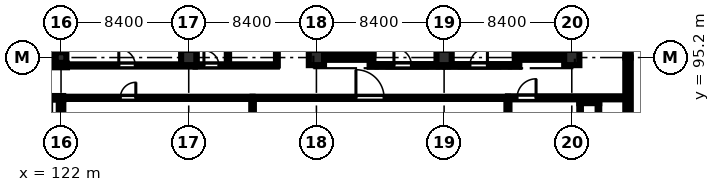
"""IFC4 building model, lengths in metres.
Left out: names, types, materials, properties, quantities, classifications, styles, units other than length and angle.
Written with IfcOpenShell. Run it as: python <this file> out.ifc"""

import sys

from ifc_helpers import new_model, si_unit, direction, frame, frame_2d, origin, origin_2d, place, context, subcontext, project, spatial, rectangle, extrude, element, fill, save


model = new_model("IFC4")
c1 = context("Model", 3, precision=1e-05, world=origin(), true_north=direction((0.0, 1.0)))
c2 = subcontext(c1, "Body", "Model", "MODEL_VIEW")
j1 = project(units=[si_unit("LENGTHUNIT", "METRE"), si_unit("PLANEANGLEUNIT", "RADIAN")], contexts=[c1])
p1 = place(None, origin())
s1 = spatial("IfcSite", under=j1, at=p1, CompositionType="ELEMENT")
p2 = place(p1, origin())
s2 = spatial("IfcBuilding", under=s1, at=p2, CompositionType="ELEMENT")
p3 = place(p2, origin())
s3 = spatial("IfcBuildingStorey", under=s2, at=p3, CompositionType="ELEMENT", Elevation=0.0)
for number, where, z_axis, x_axis in (
    (1, (121.15, 95.2, 0.0), (0.0, 0.0, 1.0), (1.0, 0.0, 0.0)),
    (2, (122.0, 95.2, 0.0), (0.0, 0.0, 1.0), (1.0, 0.0, 0.0)),
):
    element("IfcColumn", number, at=place(p3, frame(where, z_axis=z_axis, x_axis=x_axis)), inside=s3, PredefinedType="COLUMN", context=c2, shape_type="SweptSolid", body=[
        extrude(rectangle(XDim=0.7, YDim=0.7, at=origin_2d()), origin(), (0.0, 0.0, 1.0), 5.18),
    ])
for number, where, z_axis, x_axis in (
    (3, (130.4, 95.2, 0.0), (0.0, 0.0, 1.0), (1.0, 0.0, 0.0)),
    (4, (138.8, 95.2, 0.0), (0.0, 0.0, 1.0), (1.0, 0.0, 0.0)),
    (5, (147.2, 95.2, 0.0), (0.0, 0.0, 1.0), (1.0, 0.0, 0.0)),
    (6, (155.6, 95.2, 0.0), (0.0, 0.0, 1.0), (1.0, 0.0, 0.0)),
):
    element("IfcColumn", number, at=place(p3, frame(where, z_axis=z_axis, x_axis=x_axis)), inside=s3, PredefinedType="COLUMN", context=c2, shape_type="SweptSolid", body=[
        extrude(rectangle(XDim=1.0, YDim=1.0, at=origin_2d()), origin(), (0.0, 0.0, 1.0), 5.18),
    ])
p4 = place(p3, frame((138.65, 95.25, 0.0), z_axis=(0.0, 0.0, 1.0), x_axis=(1.0, 0.0, 0.0)))
e7 = element("IfcWall", 7, at=p4, inside=s3, PredefinedType="SHEAR", context=c2, shape_type="SweptSolid", body=[
    extrude(rectangle(XDim=3.9, YDim=0.4, at=frame_2d((1.95, 0.0))), origin(), (0.0, 0.0, 1.0), 5.18),
])
p5 = place(p3, frame((138.85, 95.45, 0.0), z_axis=(0.0, 0.0, 1.0), x_axis=(0.0, 1.0, 0.0)))
e8 = element("IfcWall", 8, at=p5, inside=s3, PredefinedType="SHEAR", context=c2, shape_type="SweptSolid", body=[
    extrude(rectangle(XDim=7.9, YDim=0.4, at=frame_2d((3.95, 0.0))), origin(), (0.0, 0.0, 1.0), 5.18),
])
p6 = place(p3, frame((142.35, 95.45, 0.0), z_axis=(0.0, 0.0, 1.0), x_axis=(0.0, 1.0, 0.0)))
e9 = element("IfcWall", 9, at=p6, inside=s3, PredefinedType="SHEAR", context=c2, shape_type="SweptSolid", body=[
    extrude(rectangle(XDim=7.9, YDim=0.4, at=frame_2d((3.95, 0.0))), origin(), (0.0, 0.0, 1.0), 5.18),
])
p7 = place(p6, frame((0.22, 0.0, 0.0)))
e10 = element("IfcOpeningElement", 10, at=p7, cuts=e9, PredefinedType="OPENING", context=c2, shape_type="SweptSolid", body=[
    extrude(rectangle(XDim=1.15, YDim=2.15, at=frame_2d((0.575, 1.075))), frame((0.0, 0.21, 0.0), z_axis=(0.0, -1.0, 0.0), x_axis=(1.0, 0.0, 0.0)), (0.0, 0.0, 1.0), 0.42),
])
p8 = place(p3, frame((151.85, 95.25, 0.0), z_axis=(0.0, 0.0, 1.0), x_axis=(1.0, 0.0, 0.0)))
e11 = element("IfcWall", 11, at=p8, inside=s3, PredefinedType="SHEAR", context=c2, shape_type="SweptSolid", body=[
    extrude(rectangle(XDim=3.9, YDim=0.4, at=frame_2d((1.95, 0.0))), origin(), (0.0, 0.0, 1.0), 5.18),
])
p9 = place(p3, frame((152.05, 95.45, 0.0), z_axis=(0.0, 0.0, 1.0), x_axis=(0.0, 1.0, 0.0)))
e12 = element("IfcWall", 12, at=p9, inside=s3, PredefinedType="SHEAR", context=c2, shape_type="SweptSolid", body=[
    extrude(rectangle(XDim=7.9, YDim=0.4, at=frame_2d((3.95, 0.0))), origin(), (0.0, 0.0, 1.0), 5.18),
])
p10 = place(p9, frame((0.35, 0.0, 0.0)))
e13 = element("IfcOpeningElement", 13, at=p10, cuts=e12, PredefinedType="OPENING", context=c2, shape_type="SweptSolid", body=[
    extrude(rectangle(XDim=1.15, YDim=2.15, at=frame_2d((0.575, 1.075))), frame((0.0, 0.21, 0.0), z_axis=(0.0, -1.0, 0.0), x_axis=(1.0, 0.0, 0.0)), (0.0, 0.0, 1.0), 0.42),
])
p11 = place(p3, frame((155.55, 95.45, 0.0), z_axis=(0.0, 0.0, 1.0), x_axis=(0.0, 1.0, 0.0)))
e14 = element("IfcWall", 14, at=p11, inside=s3, PredefinedType="SHEAR", context=c2, shape_type="SweptSolid", body=[
    extrude(rectangle(XDim=7.9, YDim=0.4, at=frame_2d((3.95, 0.0))), origin(), (0.0, 0.0, 1.0), 5.18),
])
p12 = place(p3, frame((159.3, 95.2, 0.0), z_axis=(0.0, 0.0, 1.0), x_axis=(0.0, -1.0, 0.0)))
e15 = element("IfcWall", 15, at=p12, inside=s3, PredefinedType="STANDARD", context=c2, shape_type="SweptSolid", body=[
    extrude(rectangle(XDim=8.4, YDim=0.36, at=frame_2d((4.2, 0.0))), origin(), (0.0, 0.0, 1.0), 4.78),
])
p13 = place(p12, frame((3.6, 0.0, 1.1)))
e16 = element("IfcOpeningElement", 16, at=p13, cuts=e15, PredefinedType="OPENING", context=c2, shape_type="SweptSolid", body=[
    extrude(rectangle(XDim=1.8, YDim=1.8, at=frame_2d((0.9, 0.9))), frame((0.0, 0.19, 0.0), z_axis=(0.0, -1.0, 0.0), x_axis=(1.0, 0.0, 0.0)), (0.0, 0.0, 1.0), 0.38),
])
p14 = place(p3, frame((159.3, 103.6, 0.0), z_axis=(0.0, 0.0, 1.0), x_axis=(0.0, -1.0, 0.0)))
e17 = element("IfcWall", 17, at=p14, inside=s3, PredefinedType="STANDARD", context=c2, shape_type="SweptSolid", body=[
    extrude(rectangle(XDim=8.4, YDim=0.36, at=frame_2d((4.2, 0.0))), origin(), (0.0, 0.0, 1.0), 4.78),
])
p15 = place(p14, frame((1.15, 0.0, 1.1)))
e18 = element("IfcOpeningElement", 18, at=p15, cuts=e17, PredefinedType="OPENING", context=c2, shape_type="SweptSolid", body=[
    extrude(rectangle(XDim=1.4, YDim=1.4, at=frame_2d((0.7, 0.7))), frame((0.0, 0.19, 0.0), z_axis=(0.0, -1.0, 0.0), x_axis=(1.0, 0.0, 0.0)), (0.0, 0.0, 1.0), 0.38),
])
p16 = place(p3, frame((122.0, 87.15, 0.0), z_axis=(0.0, 0.0, 1.0), x_axis=(0.0, 1.0, 0.0)))
e19 = element("IfcWall", 19, at=p16, inside=s3, PredefinedType="STANDARD", context=c2, shape_type="SweptSolid", body=[
    extrude(rectangle(XDim=5.27, YDim=0.3, at=frame_2d((2.635, 0.0))), origin(), (0.0, 0.0, 1.0), 4.43),
])
p17 = place(p3, frame((122.14, 92.55, 0.0), z_axis=(0.0, 0.0, 1.0), x_axis=(-1.0, 0.0, 0.0)))
e20 = element("IfcWall", 20, at=p17, inside=s3, PredefinedType="STANDARD", context=c2, shape_type="SweptSolid", body=[
    extrude(rectangle(XDim=1.11, YDim=0.24, at=frame_2d((0.555, 0.0))), origin(), (0.0, 0.0, 1.0), 5.18),
])
p18 = place(p3, frame((121.03, 94.68, 0.0), z_axis=(0.0, 0.0, 1.0), x_axis=(1.0, 0.0, 0.0)))
e21 = element("IfcWall", 21, at=p18, inside=s3, PredefinedType="STANDARD", context=c2, shape_type="SweptSolid", body=[
    extrude(rectangle(XDim=1.36, YDim=0.24, at=frame_2d((0.68, 0.0))), origin(), (0.0, 0.0, 1.0), 5.18),
])
p19 = place(p3, frame((122.0, 95.55, 0.0), z_axis=(0.0, 0.0, 1.0), x_axis=(0.0, 1.0, 0.0)))
e22 = element("IfcWall", 22, at=p19, inside=s3, PredefinedType="STANDARD", context=c2, shape_type="SweptSolid", body=[
    extrude(rectangle(XDim=7.7, YDim=0.3, at=frame_2d((3.85, 0.0))), origin(), (0.0, 0.0, 1.0), 4.43),
])
p20 = place(p3, frame((142.3, 94.68, 0.0), z_axis=(0.0, 0.0, 1.0), x_axis=(1.0, 0.0, 0.0)))
e23 = element("IfcWall", 23, at=p20, inside=s3, PredefinedType="STANDARD", context=c2, shape_type="SweptSolid", body=[
    extrude(rectangle(XDim=4.8, YDim=0.18, at=frame_2d((2.4, 0.0))), origin(), (0.0, 0.0, 1.0), 5.18),
])
p21 = place(p20, frame((1.6, 0.0, 0.0)))
e24 = element("IfcOpeningElement", 24, at=p21, cuts=e23, PredefinedType="OPENING", context=c2, shape_type="SweptSolid", body=[
    extrude(rectangle(XDim=1.15, YDim=2.15, at=frame_2d((0.575, 1.075))), frame((0.0, 0.1, 0.0), z_axis=(0.0, -1.0, 0.0), x_axis=(1.0, 0.0, 0.0)), (0.0, 0.0, 1.0), 0.2),
])
p22 = place(p3, frame((147.3, 94.68, 0.0), z_axis=(0.0, 0.0, 1.0), x_axis=(1.0, 0.0, 0.0)))
e25 = element("IfcWall", 25, at=p22, inside=s3, PredefinedType="STANDARD", context=c2, shape_type="SweptSolid", body=[
    extrude(rectangle(XDim=4.85, YDim=0.18, at=frame_2d((2.425, 0.0))), origin(), (0.0, 0.0, 1.0), 5.18),
])
p23 = place(p22, frame((1.6, 0.0, 0.0)))
e26 = element("IfcOpeningElement", 26, at=p23, cuts=e25, PredefinedType="OPENING", context=c2, shape_type="SweptSolid", body=[
    extrude(rectangle(XDim=1.15, YDim=2.15, at=frame_2d((0.575, 1.075))), frame((0.0, 0.1, 0.0), z_axis=(0.0, -1.0, 0.0), x_axis=(1.0, 0.0, 0.0)), (0.0, 0.0, 1.0), 0.2),
])
p24 = place(p3, frame((130.85, 94.68, 0.0), z_axis=(0.0, 0.0, 1.0), x_axis=(1.0, 0.0, 0.0)))
e27 = element("IfcWall", 27, at=p24, inside=s3, PredefinedType="PARTITIONING", context=c2, shape_type="SweptSolid", body=[
    extrude(rectangle(XDim=5.35, YDim=0.15, at=frame_2d((2.675, 0.0))), origin(), (0.0, 0.0, 1.0), 5.18),
])
p25 = place(p24, frame((0.55, 0.0, 0.0)))
e28 = element("IfcOpeningElement", 28, at=p25, cuts=e27, PredefinedType="OPENING", context=c2, shape_type="SweptSolid", body=[
    extrude(rectangle(XDim=0.98, YDim=2.12, at=frame_2d((0.49, 1.06))), frame((0.0, 0.085, 0.0), z_axis=(0.0, -1.0, 0.0), x_axis=(1.0, 0.0, 0.0)), (0.0, 0.0, 1.0), 0.17),
])
p26 = place(p3, frame((132.98, 94.68, 0.0), z_axis=(0.0, 0.0, 1.0), x_axis=(0.0, 1.0, 0.0)))
e29 = element("IfcWall", 29, at=p26, inside=s3, PredefinedType="PARTITIONING", context=c2, shape_type="SweptSolid", body=[
    extrude(rectangle(XDim=8.57, YDim=0.15, at=frame_2d((4.285, 0.0))), origin(), (0.0, 0.0, 1.0), 5.18),
])
p27 = place(p26, frame((0.9, 0.0, 0.0)))
e30 = element("IfcOpeningElement", 30, at=p27, cuts=e29, PredefinedType="OPENING", context=c2, shape_type="SweptSolid", body=[
    extrude(rectangle(XDim=1.0, YDim=2.12, at=frame_2d((0.5, 1.06))), frame((0.0, 0.085, 0.0), z_axis=(0.0, -1.0, 0.0), x_axis=(1.0, 0.0, 0.0)), (0.0, 0.0, 1.0), 0.17),
])
p28 = place(p26, frame((3.7, 0.0, 0.0)))
e31 = element("IfcOpeningElement", 31, at=p28, cuts=e29, PredefinedType="OPENING", context=c2, shape_type="SweptSolid", body=[
    extrude(rectangle(XDim=0.92, YDim=2.1, at=frame_2d((0.46, 1.05))), frame((0.0, 0.085, 0.0), z_axis=(0.0, -1.0, 0.0), x_axis=(1.0, 0.0, 0.0)), (0.0, 0.0, 1.0), 0.17),
])
p29 = place(p26, frame((6.5, 0.0, 0.0)))
e32 = element("IfcOpeningElement", 32, at=p29, cuts=e29, PredefinedType="OPENING", context=c2, shape_type="SweptSolid", body=[
    extrude(rectangle(XDim=0.92, YDim=2.1, at=frame_2d((0.46, 1.05))), frame((0.0, 0.085, 0.0), z_axis=(0.0, -1.0, 0.0), x_axis=(1.0, 0.0, 0.0)), (0.0, 0.0, 1.0), 0.17),
])
p30 = place(p3, frame((130.85, 94.68, 0.0), z_axis=(0.0, 0.0, 1.0), x_axis=(0.0, 1.0, 0.0)))
e33 = element("IfcWall", 33, at=p30, inside=s3, PredefinedType="PARTITIONING", context=c2, shape_type="SweptSolid", body=[
    extrude(rectangle(XDim=8.57, YDim=0.15, at=frame_2d((4.285, 0.0))), origin(), (0.0, 0.0, 1.0), 5.18),
])
p31 = place(p3, frame((136.2, 94.68, 0.0), z_axis=(0.0, 0.0, 1.0), x_axis=(0.0, 1.0, 0.0)))
e34 = element("IfcWall", 34, at=p31, inside=s3, PredefinedType="PARTITIONING", context=c2, shape_type="SweptSolid", body=[
    extrude(rectangle(XDim=9.07, YDim=0.12, at=frame_2d((4.535, 0.0))), origin(), (0.0, 0.0, 1.0), 5.18),
])
p32 = place(p3, frame((122.4, 94.68, 0.0), z_axis=(0.0, 0.0, 1.0), x_axis=(1.0, 0.0, 0.0)))
e35 = element("IfcWall", 35, at=p32, inside=s3, PredefinedType="PARTITIONING", context=c2, shape_type="SweptSolid", body=[
    extrude(rectangle(XDim=8.4, YDim=0.145, at=frame_2d((4.2, 0.0))), origin(), (0.0, 0.0, 1.0), 5.18),
])
p33 = place(p32, frame((3.4, 0.0, 0.0)))
e36 = element("IfcOpeningElement", 36, at=p33, cuts=e35, PredefinedType="OPENING", context=c2, shape_type="SweptSolid", body=[
    extrude(rectangle(XDim=1.08, YDim=2.15, at=frame_2d((0.54, 1.075))), frame((0.0, 0.083, 0.0), z_axis=(0.0, -1.0, 0.0), x_axis=(1.0, 0.0, 0.0)), (0.0, 0.0, 1.0), 0.165),
])
p34 = place(p3, frame((122.15, 92.55, 0.0), z_axis=(0.0, 0.0, 1.0), x_axis=(1.0, 0.0, 0.0)))
e37 = element("IfcWall", 37, at=p34, inside=s3, PredefinedType="PARTITIONING", context=c2, shape_type="SweptSolid", body=[
    extrude(rectangle(XDim=12.45, YDim=0.145, at=frame_2d((6.225, 0.0))), origin(), (0.0, 0.0, 1.0), 5.18),
])
p35 = place(p34, frame((3.75, 0.0, 0.0)))
e38 = element("IfcOpeningElement", 38, at=p35, cuts=e37, PredefinedType="OPENING", context=c2, shape_type="SweptSolid", body=[
    extrude(rectangle(XDim=1.02, YDim=2.15, at=frame_2d((0.51, 1.075))), frame((0.0, 0.083, 0.0), z_axis=(0.0, -1.0, 0.0), x_axis=(1.0, 0.0, 0.0)), (0.0, 0.0, 1.0), 0.165),
])
p36 = place(p3, frame((134.6, 92.55, 0.0), z_axis=(0.0, 0.0, 1.0), x_axis=(1.0, 0.0, 0.0)))
e39 = element("IfcWall", 39, at=p36, inside=s3, PredefinedType="PARTITIONING", context=c2, shape_type="SweptSolid", body=[
    extrude(rectangle(XDim=16.8, YDim=0.145, at=frame_2d((8.4, 0.0))), origin(), (0.0, 0.0, 1.0), 5.18),
])
p37 = place(p36, frame((6.8, 0.0, 0.0)))
e40 = element("IfcOpeningElement", 40, at=p37, cuts=e39, PredefinedType="OPENING", context=c2, shape_type="SweptSolid", body=[
    extrude(rectangle(XDim=1.85, YDim=2.25, at=frame_2d((0.925, 1.125))), frame((0.0, 0.083, 0.0), z_axis=(0.0, -1.0, 0.0), x_axis=(1.0, 0.0, 0.0)), (0.0, 0.0, 1.0), 0.165),
])
p38 = place(p3, frame((134.6, 78.55, 0.0), z_axis=(0.0, 0.0, 1.0), x_axis=(0.0, 1.0, 0.0)))
e41 = element("IfcWall", 41, at=p38, inside=s3, PredefinedType="PARTITIONING", context=c2, shape_type="SweptSolid", body=[
    extrude(rectangle(XDim=14.0, YDim=0.172, at=frame_2d((7.0, 0.0))), origin(), (0.0, 0.0, 1.0), 4.63),
])
p39 = place(p3, frame((151.4, 92.55, 0.0), z_axis=(0.0, 0.0, 1.0), x_axis=(1.0, 0.0, 0.0)))
e42 = element("IfcWall", 42, at=p39, inside=s3, PredefinedType="SOLIDWALL", context=c2, shape_type="SweptSolid", body=[
    extrude(rectangle(XDim=7.72, YDim=0.2, at=frame_2d((3.86, 0.0))), origin(), (0.0, 0.0, 1.0), 5.18),
])
p40 = place(p39, frame((0.6, 0.0, 0.0)))
e43 = element("IfcOpeningElement", 43, at=p40, cuts=e42, PredefinedType="OPENING", context=c2, shape_type="SweptSolid", body=[
    extrude(rectangle(XDim=1.25, YDim=2.2, at=frame_2d((0.625, 1.1))), frame((0.0, 0.11, 0.0), z_axis=(0.0, -1.0, 0.0), x_axis=(1.0, 0.0, 0.0)), (0.0, 0.0, 1.0), 0.22),
])
p41 = place(p3, frame((151.4, 78.55, 0.0), z_axis=(0.0, 0.0, 1.0), x_axis=(0.0, 1.0, 0.0)))
e44 = element("IfcWall", 44, at=p41, inside=s3, PredefinedType="SOLIDWALL", context=c2, shape_type="SweptSolid", body=[
    extrude(rectangle(XDim=14.0, YDim=0.2, at=frame_2d((7.0, 0.0))), origin(), (0.0, 0.0, 1.0), 4.78),
])
p42 = place(p3, frame((156.095, 92.252, 0.0), z_axis=(0.0, 0.0, 1.0), x_axis=(1.0, 0.0, 0.0)))
e45 = element("IfcWall", 45, at=p42, inside=s3, PredefinedType="PARTITIONING", context=c2, shape_type="SweptSolid", body=[
    extrude(rectangle(XDim=1.31, YDim=0.105, at=frame_2d((0.655, 0.0))), origin(), (0.0, 0.0, 1.0), 5.18),
])
for number, where, z_axis, x_axis in (
    (46, (156.147, 91.2, 0.0), (0.0, 0.0, 1.0), (0.0, 1.0, 0.0)),
    (47, (157.353, 91.2, 0.0), (0.0, 0.0, 1.0), (0.0, 1.0, 0.0)),
):
    element("IfcWall", number, at=place(p3, frame(where, z_axis=z_axis, x_axis=x_axis)), inside=s3, PredefinedType="PARTITIONING", context=c2, shape_type="SweptSolid", body=[
        extrude(rectangle(XDim=1.0, YDim=0.105, at=frame_2d((0.5, 0.0))), origin(), (0.0, 0.0, 1.0), 5.18),
    ])
p43 = place(p21, origin())
e48 = element("IfcDoor", 48, at=p43, inside=s3, OperationType="SINGLE_SWING_LEFT", PredefinedType="DOOR", context=c2, shape_type="SweptSolid", body=[
    extrude(rectangle(XDim=1.15, YDim=2.15, at=frame_2d((0.575, 1.075))), frame((0.0, 0.025, 0.0), z_axis=(0.0, -1.0, 0.0), x_axis=(1.0, 0.0, 0.0)), (0.0, 0.0, 1.0), 0.05),
])
fill(e24, e48)
p44 = place(p23, origin())
e49 = element("IfcDoor", 49, at=p44, inside=s3, OperationType="SINGLE_SWING_RIGHT", PredefinedType="DOOR", context=c2, shape_type="SweptSolid", body=[
    extrude(rectangle(XDim=1.15, YDim=2.15, at=frame_2d((0.575, 1.075))), frame((0.0, 0.025, 0.0), z_axis=(0.0, -1.0, 0.0), x_axis=(1.0, 0.0, 0.0)), (0.0, 0.0, 1.0), 0.05),
])
fill(e26, e49)
p45 = place(p25, origin())
e50 = element("IfcDoor", 50, at=p45, inside=s3, OperationType="SINGLE_SWING_LEFT", PredefinedType="DOOR", context=c2, shape_type="SweptSolid", body=[
    extrude(rectangle(XDim=0.98, YDim=2.12, at=frame_2d((0.49, 1.06))), frame((0.0, 0.025, 0.0), z_axis=(0.0, -1.0, 0.0), x_axis=(1.0, 0.0, 0.0)), (0.0, 0.0, 1.0), 0.05),
])
fill(e28, e50)
p46 = place(p27, origin())
e51 = element("IfcDoor", 51, at=p46, inside=s3, OperationType="SINGLE_SWING_RIGHT", PredefinedType="DOOR", context=c2, shape_type="SweptSolid", body=[
    extrude(rectangle(XDim=1.0, YDim=2.12, at=frame_2d((0.5, 1.06))), frame((0.0, 0.025, 0.0), z_axis=(0.0, -1.0, 0.0), x_axis=(1.0, 0.0, 0.0)), (0.0, 0.0, 1.0), 0.05),
])
fill(e30, e51)
p47 = place(p33, origin())
e52 = element("IfcDoor", 52, at=p47, inside=s3, OperationType="SINGLE_SWING_LEFT", PredefinedType="DOOR", context=c2, shape_type="SweptSolid", body=[
    extrude(rectangle(XDim=1.08, YDim=2.15, at=frame_2d((0.54, 1.075))), frame((0.0, 0.025, 0.0), z_axis=(0.0, -1.0, 0.0), x_axis=(1.0, 0.0, 0.0)), (0.0, 0.0, 1.0), 0.05),
])
fill(e36, e52)
p48 = place(p35, origin())
e53 = element("IfcDoor", 53, at=p48, inside=s3, OperationType="SINGLE_SWING_RIGHT", PredefinedType="DOOR", context=c2, shape_type="SweptSolid", body=[
    extrude(rectangle(XDim=1.02, YDim=2.15, at=frame_2d((0.51, 1.075))), frame((0.0, 0.025, 0.0), z_axis=(0.0, -1.0, 0.0), x_axis=(1.0, 0.0, 0.0)), (0.0, 0.0, 1.0), 0.05),
])
fill(e38, e53)
p49 = place(p37, origin())
e54 = element("IfcDoor", 54, at=p49, inside=s3, OperationType="SINGLE_SWING_LEFT", PredefinedType="DOOR", context=c2, shape_type="SweptSolid", body=[
    extrude(rectangle(XDim=1.85, YDim=2.25, at=frame_2d((0.925, 1.125))), frame((0.0, 0.025, 0.0), z_axis=(0.0, -1.0, 0.0), x_axis=(1.0, 0.0, 0.0)), (0.0, 0.0, 1.0), 0.05),
])
fill(e40, e54)
p50 = place(p40, origin())
e55 = element("IfcDoor", 55, at=p50, inside=s3, OperationType="SINGLE_SWING_RIGHT", PredefinedType="DOOR", context=c2, shape_type="SweptSolid", body=[
    extrude(rectangle(XDim=1.25, YDim=2.2, at=frame_2d((0.625, 1.1))), frame((0.0, 0.025, 0.0), z_axis=(0.0, -1.0, 0.0), x_axis=(1.0, 0.0, 0.0)), (0.0, 0.0, 1.0), 0.05),
])
fill(e43, e55)
save(model, sys.argv[1])
